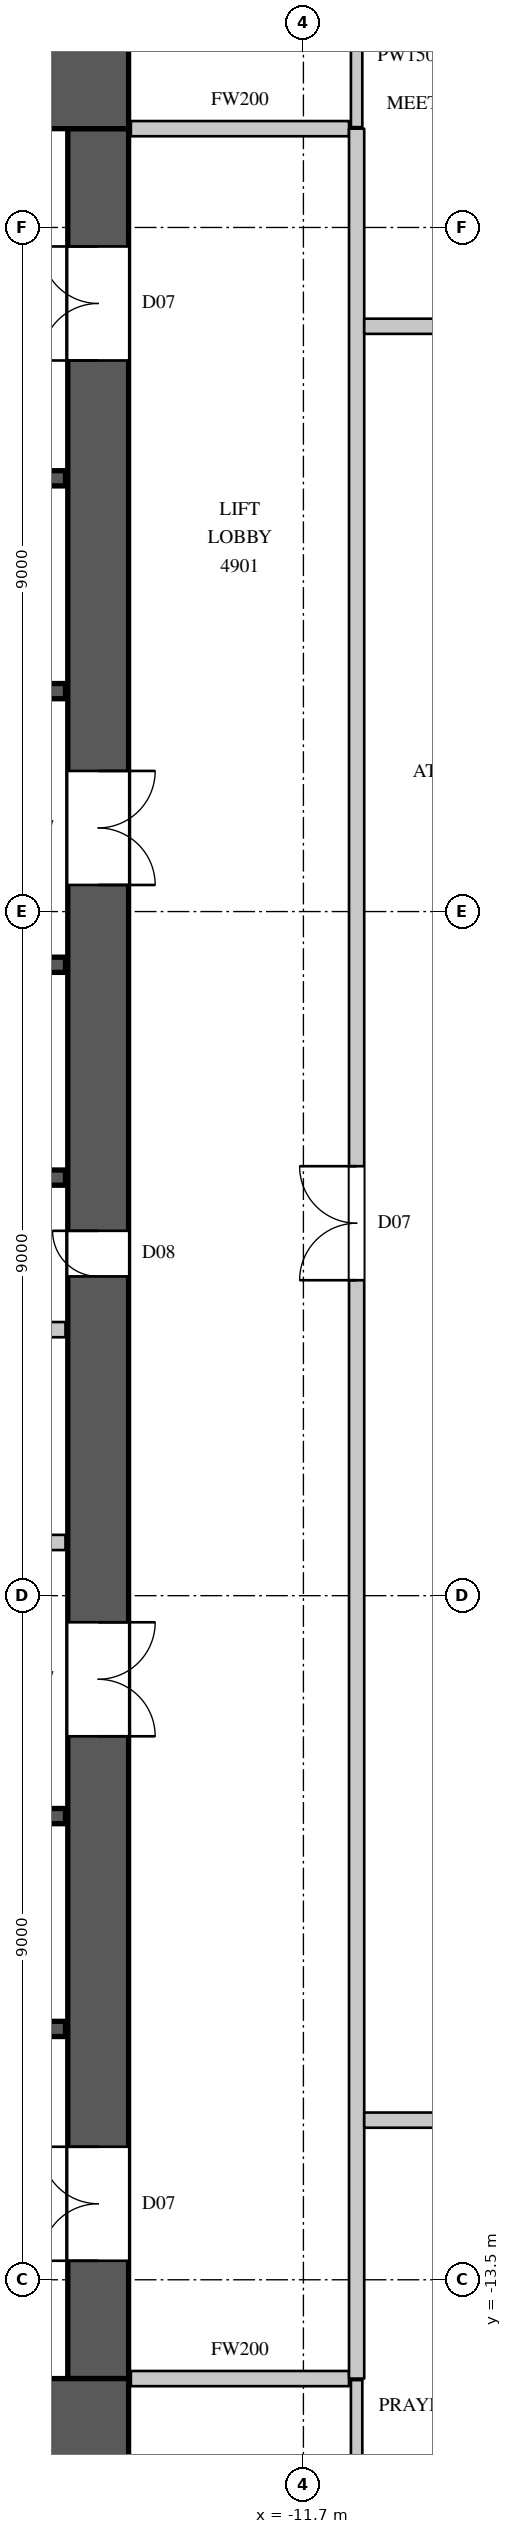
"""IFC4 building model, lengths in metres.
Left out: names, types, materials, properties, quantities, classifications, styles, units other than length and angle.
Written with IfcOpenShell. Run it as: python <this file> out.ifc"""

import sys

from ifc_helpers import new_model, si_unit, direction, frame, frame_2d, origin, place, context, subcontext, project, spatial, rectangle, extrude, element, fill, save


model = new_model("IFC4")
c1 = context("Model", 3, precision=1e-05, world=origin(), true_north=direction((0.0, 1.0)))
c2 = subcontext(c1, "Body", "Model", "MODEL_VIEW")
j1 = project(units=[si_unit("LENGTHUNIT", "METRE"), si_unit("PLANEANGLEUNIT", "RADIAN")], contexts=[c1])
p1 = place(None, origin())
s1 = spatial("IfcSite", under=j1, at=p1, CompositionType="ELEMENT")
p2 = place(p1, origin())
s2 = spatial("IfcBuilding", under=s1, at=p2, CompositionType="ELEMENT")
p3 = place(p2, frame((0.0, 0.0, 222.0)))
s3 = spatial("IfcBuildingStorey", under=s2, at=p3, CompositionType="ELEMENT", Elevation=222.0)
for number, where, z_axis, x_axis in (
    (1, (-30.0, 15.4, 0.0), (0.0, 0.0, 1.0), (1.0, 0.0, 0.0)),
    (2, (-30.0, -15.4, 0.0), (0.0, 0.0, 1.0), (1.0, 0.0, 0.0)),
):
    element("IfcWall", number, at=place(p3, frame(where, z_axis=z_axis, x_axis=x_axis)), inside=s3, PredefinedType="SHEAR", context=c2, shape_type="SweptSolid", body=[
        extrude(rectangle(XDim=16.0, YDim=1.2, at=frame_2d((8.0, 0.0))), origin(), (0.0, 0.0, 1.0), 4.1),
    ])
p4 = place(p3, frame((-14.4, -14.8, 0.0), z_axis=(0.0, 0.0, 1.0), x_axis=(0.0, 1.0, 0.0)))
e3 = element("IfcWall", 3, at=p4, inside=s3, PredefinedType="SHEAR", context=c2, shape_type="SweptSolid", body=[
    extrude(rectangle(XDim=29.6, YDim=0.8, at=frame_2d((14.8, 0.0))), origin(), (0.0, 0.0, 1.0), 4.1),
])
p5 = place(p4, frame((1.55, 0.0, 0.0)))
e4 = element("IfcOpeningElement", 4, at=p5, cuts=e3, PredefinedType="OPENING", context=c2, shape_type="SweptSolid", body=[
    extrude(rectangle(XDim=1.5, YDim=2.4, at=frame_2d((0.75, 1.2))), frame((0.0, 0.41, 0.0), z_axis=(0.0, -1.0, 0.0), x_axis=(1.0, 0.0, 0.0)), (0.0, 0.0, 1.0), 0.82),
])
p6 = place(p4, frame((26.55, 0.0, 0.0)))
e5 = element("IfcOpeningElement", 5, at=p6, cuts=e3, PredefinedType="OPENING", context=c2, shape_type="SweptSolid", body=[
    extrude(rectangle(XDim=1.5, YDim=2.4, at=frame_2d((0.75, 1.2))), frame((0.0, 0.41, 0.0), z_axis=(0.0, -1.0, 0.0), x_axis=(1.0, 0.0, 0.0)), (0.0, 0.0, 1.0), 0.82),
])
p7 = place(p4, frame((8.45, 0.0, 0.0)))
e6 = element("IfcOpeningElement", 6, at=p7, cuts=e3, PredefinedType="OPENING", context=c2, shape_type="SweptSolid", body=[
    extrude(rectangle(XDim=1.5, YDim=2.4, at=frame_2d((0.75, 1.2))), frame((0.0, 0.41, 0.0), z_axis=(0.0, -1.0, 0.0), x_axis=(1.0, 0.0, 0.0)), (0.0, 0.0, 1.0), 0.82),
])
p8 = place(p4, frame((19.65, 0.0, 0.0)))
e7 = element("IfcOpeningElement", 7, at=p8, cuts=e3, PredefinedType="OPENING", context=c2, shape_type="SweptSolid", body=[
    extrude(rectangle(XDim=1.5, YDim=2.4, at=frame_2d((0.75, 1.2))), frame((0.0, 0.41, 0.0), z_axis=(0.0, -1.0, 0.0), x_axis=(1.0, 0.0, 0.0)), (0.0, 0.0, 1.0), 0.82),
])
p9 = place(p4, frame((14.5, 0.0, 0.0)))
e8 = element("IfcOpeningElement", 8, at=p9, cuts=e3, PredefinedType="OPENING", context=c2, shape_type="SweptSolid", body=[
    extrude(rectangle(XDim=0.6, YDim=2.0, at=frame_2d((0.3, 1.0))), frame((0.0, 0.41, 0.0), z_axis=(0.0, -1.0, 0.0), x_axis=(1.0, 0.0, 0.0)), (0.0, 0.0, 1.0), 0.82),
])
p10 = place(p3, frame((-29.17, -3.8, 0.0), z_axis=(0.0, 0.0, 1.0), x_axis=(1.0, 0.0, 0.0)))
e9 = element("IfcWall", 9, at=p10, inside=s3, PredefinedType="PARTITIONING", context=c2, shape_type="SweptSolid", body=[
    extrude(rectangle(XDim=14.34, YDim=0.2, at=frame_2d((7.17, 0.0))), origin(), (0.0, 0.0, 1.0), 3.8),
])
p11 = place(p10, frame((6.7, 0.0, 0.0)))
e10 = element("IfcOpeningElement", 10, at=p11, cuts=e9, PredefinedType="OPENING", context=c2, shape_type="SweptSolid", body=[
    extrude(rectangle(XDim=0.9, YDim=2.2, at=frame_2d((0.45, 1.1))), frame((0.0, 0.11, 0.0), z_axis=(0.0, -1.0, 0.0), x_axis=(1.0, 0.0, 0.0)), (0.0, 0.0, 1.0), 0.22),
])
for number, where, z_axis, x_axis in (
    (11, (-13.97, -14.8, 0.0), (0.0, 0.0, 1.0), (1.0, 0.0, 0.0)),
    (12, (-13.97, 14.8, 0.0), (0.0, 0.0, 1.0), (1.0, 0.0, 0.0)),
):
    element("IfcWall", number, at=place(p3, frame(where, z_axis=z_axis, x_axis=x_axis)), inside=s3, PredefinedType="PARTITIONING", context=c2, shape_type="SweptSolid", body=[
        extrude(rectangle(XDim=2.87, YDim=0.2, at=frame_2d((1.435, 0.0))), origin(), (0.0, 0.0, 1.0), 3.8),
    ])
p12 = place(p3, frame((-11.0, -14.8, 0.0), z_axis=(0.0, 0.0, 1.0), x_axis=(0.0, 1.0, 0.0)))
e13 = element("IfcWall", 13, at=p12, inside=s3, PredefinedType="PARTITIONING", context=c2, shape_type="SweptSolid", body=[
    extrude(rectangle(XDim=29.6, YDim=0.2, at=frame_2d((14.8, 0.0))), origin(), (0.0, 0.0, 1.0), 3.8),
])
p13 = place(p12, frame((14.45, 0.0, 0.0)))
e14 = element("IfcOpeningElement", 14, at=p13, cuts=e13, PredefinedType="OPENING", context=c2, shape_type="SweptSolid", body=[
    extrude(rectangle(XDim=1.5, YDim=2.4, at=frame_2d((0.75, 1.2))), frame((0.0, 0.11, 0.0), z_axis=(0.0, -1.0, 0.0), x_axis=(1.0, 0.0, 0.0)), (0.0, 0.0, 1.0), 0.22),
])
p14 = place(p3, frame((-10.9, -11.4, 0.0), z_axis=(0.0, 0.0, 1.0), x_axis=(1.0, 0.0, 0.0)))
e15 = element("IfcWall", 15, at=p14, inside=s3, PredefinedType="PARTITIONING", context=c2, shape_type="SweptSolid", body=[
    extrude(rectangle(XDim=21.2, YDim=0.2, at=frame_2d((10.6, 0.0))), origin(), (0.0, 0.0, 1.0), 3.8),
])
p15 = place(p14, frame((0.95, 0.0, 0.0)))
e16 = element("IfcOpeningElement", 16, at=p15, cuts=e15, PredefinedType="OPENING", context=c2, shape_type="SweptSolid", body=[
    extrude(rectangle(XDim=0.95, YDim=2.2, at=frame_2d((0.475, 1.1))), frame((0.0, 0.11, 0.0), z_axis=(0.0, -1.0, 0.0), x_axis=(1.0, 0.0, 0.0)), (0.0, 0.0, 1.0), 0.22),
])
p16 = place(p14, frame((4.2, 0.0, 0.0)))
e17 = element("IfcOpeningElement", 17, at=p16, cuts=e15, PredefinedType="OPENING", context=c2, shape_type="SweptSolid", body=[
    extrude(rectangle(XDim=0.9, YDim=2.2, at=frame_2d((0.45, 1.1))), frame((0.0, 0.11, 0.0), z_axis=(0.0, -1.0, 0.0), x_axis=(1.0, 0.0, 0.0)), (0.0, 0.0, 1.0), 0.22),
])
p17 = place(p14, frame((8.35, 0.0, 0.0)))
e18 = element("IfcOpeningElement", 18, at=p17, cuts=e15, PredefinedType="OPENING", context=c2, shape_type="SweptSolid", body=[
    extrude(rectangle(XDim=1.1, YDim=2.4, at=frame_2d((0.55, 1.2))), frame((0.0, 0.11, 0.0), z_axis=(0.0, -1.0, 0.0), x_axis=(1.0, 0.0, 0.0)), (0.0, 0.0, 1.0), 0.22),
])
p18 = place(p14, frame((18.0, 0.0, 0.0)))
e19 = element("IfcOpeningElement", 19, at=p18, cuts=e15, PredefinedType="OPENING", context=c2, shape_type="SweptSolid", body=[
    extrude(rectangle(XDim=1.1, YDim=2.4, at=frame_2d((0.55, 1.2))), frame((0.0, 0.11, 0.0), z_axis=(0.0, -1.0, 0.0), x_axis=(1.0, 0.0, 0.0)), (0.0, 0.0, 1.0), 0.22),
])
p19 = place(p3, frame((-10.9, 12.2, 0.0), z_axis=(0.0, 0.0, 1.0), x_axis=(1.0, 0.0, 0.0)))
e20 = element("IfcWall", 20, at=p19, inside=s3, PredefinedType="PARTITIONING", context=c2, shape_type="SweptSolid", body=[
    extrude(rectangle(XDim=3.704, YDim=0.2, at=frame_2d((1.852, 0.0))), origin(), (0.0, 0.0, 1.0), 3.8),
])
p20 = place(p19, frame((1.7, 0.0, 0.0)))
e21 = element("IfcOpeningElement", 21, at=p20, cuts=e20, PredefinedType="OPENING", context=c2, shape_type="SweptSolid", body=[
    extrude(rectangle(XDim=1.1, YDim=2.4, at=frame_2d((0.55, 1.2))), frame((0.0, 0.11, 0.0), z_axis=(0.0, -1.0, 0.0), x_axis=(1.0, 0.0, 0.0)), (0.0, 0.0, 1.0), 0.22),
])
for number, where, z_axis, x_axis in (
    (22, (-11.0, -16.7, 0.0), (0.0, 0.0, 1.0), (0.0, 1.0, 0.0)),
    (23, (-11.0, 14.82, 0.0), (0.0, 0.0, 1.0), (0.0, 1.0, 0.0)),
):
    element("IfcWall", number, at=place(p3, frame(where, z_axis=z_axis, x_axis=x_axis)), inside=s3, PredefinedType="PARTITIONING", context=c2, shape_type="SweptSolid", body=[
        extrude(rectangle(XDim=1.88, YDim=0.15, at=frame_2d((0.94, 0.0))), origin(), (0.0, 0.0, 1.0), 3.8),
    ])
p21 = place(p3, frame((-29.17, -1.0, 0.0), z_axis=(0.0, 0.0, 1.0), x_axis=(1.0, 0.0, 0.0)))
e24 = element("IfcWall", 24, at=p21, inside=s3, PredefinedType="PARTITIONING", context=c2, shape_type="SweptSolid", body=[
    extrude(rectangle(XDim=14.34, YDim=0.2, at=frame_2d((7.17, 0.0))), origin(), (0.0, 0.0, 1.0), 3.8),
])
p22 = place(p3, frame((-26.08, 1.0, 0.0), z_axis=(0.0, 0.0, 1.0), x_axis=(1.0, 0.0, 0.0)))
e25 = element("IfcWall", 25, at=p22, inside=s3, PredefinedType="SHEAR", context=c2, shape_type="SweptSolid", body=[
    extrude(rectangle(XDim=11.25, YDim=0.2, at=frame_2d((5.625, 0.0))), origin(), (0.0, 0.0, 1.0), 3.8),
])
p23 = place(p3, frame((-26.08, 3.8, 0.0), z_axis=(0.0, 0.0, 1.0), x_axis=(1.0, 0.0, 0.0)))
e26 = element("IfcWall", 26, at=p23, inside=s3, PredefinedType="SHEAR", context=c2, shape_type="SweptSolid", body=[
    extrude(rectangle(XDim=11.25, YDim=0.2, at=frame_2d((5.625, 0.0))), origin(), (0.0, 0.0, 1.0), 3.8),
])
p24 = place(p23, frame((0.8, 0.0, 0.0)))
e27 = element("IfcOpeningElement", 27, at=p24, cuts=e26, PredefinedType="OPENING", context=c2, shape_type="SweptSolid", body=[
    extrude(rectangle(XDim=1.1, YDim=2.2, at=frame_2d((0.55, 1.1))), frame((0.0, 0.11, 0.0), z_axis=(0.0, -1.0, 0.0), x_axis=(1.0, 0.0, 0.0)), (0.0, 0.0, 1.0), 0.22),
])
p25 = place(p23, frame((3.55, 0.0, 0.0)))
e28 = element("IfcOpeningElement", 28, at=p25, cuts=e26, PredefinedType="OPENING", context=c2, shape_type="SweptSolid", body=[
    extrude(rectangle(XDim=1.1, YDim=2.2, at=frame_2d((0.55, 1.1))), frame((0.0, 0.11, 0.0), z_axis=(0.0, -1.0, 0.0), x_axis=(1.0, 0.0, 0.0)), (0.0, 0.0, 1.0), 0.22),
])
p26 = place(p23, frame((6.25, 0.0, 0.0)))
e29 = element("IfcOpeningElement", 29, at=p26, cuts=e26, PredefinedType="OPENING", context=c2, shape_type="SweptSolid", body=[
    extrude(rectangle(XDim=1.1, YDim=2.2, at=frame_2d((0.55, 1.1))), frame((0.0, 0.11, 0.0), z_axis=(0.0, -1.0, 0.0), x_axis=(1.0, 0.0, 0.0)), (0.0, 0.0, 1.0), 0.22),
])
p27 = place(p23, frame((9.15, 0.0, 0.0)))
e30 = element("IfcOpeningElement", 30, at=p27, cuts=e26, PredefinedType="OPENING", context=c2, shape_type="SweptSolid", body=[
    extrude(rectangle(XDim=1.1, YDim=2.2, at=frame_2d((0.55, 1.1))), frame((0.0, 0.11, 0.0), z_axis=(0.0, -1.0, 0.0), x_axis=(1.0, 0.0, 0.0)), (0.0, 0.0, 1.0), 0.22),
])
p28 = place(p3, frame((-17.92, -10.2, 0.0), z_axis=(0.0, 0.0, 1.0), x_axis=(1.0, 0.0, 0.0)))
e31 = element("IfcWall", 31, at=p28, inside=s3, PredefinedType="SHEAR", context=c2, shape_type="SweptSolid", body=[
    extrude(rectangle(XDim=3.09, YDim=0.2, at=frame_2d((1.545, 0.0))), origin(), (0.0, 0.0, 1.0), 3.8),
])
p29 = place(p28, frame((1.0, 0.0, 0.0)))
e32 = element("IfcOpeningElement", 32, at=p29, cuts=e31, PredefinedType="OPENING", context=c2, shape_type="SweptSolid", body=[
    extrude(rectangle(XDim=1.1, YDim=2.2, at=frame_2d((0.55, 1.1))), frame((0.0, 0.11, 0.0), z_axis=(0.0, -1.0, 0.0), x_axis=(1.0, 0.0, 0.0)), (0.0, 0.0, 1.0), 0.22),
])
p30 = place(p3, frame((-17.9, -7.4, 0.0), z_axis=(0.0, 0.0, 1.0), x_axis=(1.0, 0.0, 0.0)))
e33 = element("IfcWall", 33, at=p30, inside=s3, PredefinedType="SHEAR", context=c2, shape_type="SweptSolid", body=[
    extrude(rectangle(XDim=3.07, YDim=0.2, at=frame_2d((1.535, 0.0))), origin(), (0.0, 0.0, 1.0), 3.8),
])
p31 = place(p3, frame((-17.92, 7.4, 0.0), z_axis=(0.0, 0.0, 1.0), x_axis=(1.0, 0.0, 0.0)))
e34 = element("IfcWall", 34, at=p31, inside=s3, PredefinedType="SHEAR", context=c2, shape_type="SweptSolid", body=[
    extrude(rectangle(XDim=3.09, YDim=0.2, at=frame_2d((1.545, 0.0))), origin(), (0.0, 0.0, 1.0), 3.8),
])
p32 = place(p3, frame((-17.92, 10.2, 0.0), z_axis=(0.0, 0.0, 1.0), x_axis=(1.0, 0.0, 0.0)))
e35 = element("IfcWall", 35, at=p32, inside=s3, PredefinedType="SHEAR", context=c2, shape_type="SweptSolid", body=[
    extrude(rectangle(XDim=3.09, YDim=0.2, at=frame_2d((1.545, 0.0))), origin(), (0.0, 0.0, 1.0), 3.8),
])
p33 = place(p32, frame((1.0, 0.0, 0.0)))
e36 = element("IfcOpeningElement", 36, at=p33, cuts=e35, PredefinedType="OPENING", context=c2, shape_type="SweptSolid", body=[
    extrude(rectangle(XDim=1.1, YDim=2.2, at=frame_2d((0.55, 1.1))), frame((0.0, 0.11, 0.0), z_axis=(0.0, -1.0, 0.0), x_axis=(1.0, 0.0, 0.0)), (0.0, 0.0, 1.0), 0.22),
])
p34 = place(p13, origin())
e37 = element("IfcDoor", 37, at=p34, inside=s3, OperationType="DOUBLE_DOOR_SINGLE_SWING", PredefinedType="DOOR", context=c2, shape_type="SweptSolid", body=[
    extrude(rectangle(XDim=1.5, YDim=2.4, at=frame_2d((0.75, 1.2))), frame((0.0, 0.025, 0.0), z_axis=(0.0, -1.0, 0.0), x_axis=(1.0, 0.0, 0.0)), (0.0, 0.0, 1.0), 0.05),
])
fill(e14, e37)
p35 = place(p5, origin())
e38 = element("IfcDoor", 38, at=p35, inside=s3, OperationType="DOUBLE_DOOR_SINGLE_SWING", PredefinedType="DOOR", context=c2, shape_type="SweptSolid", body=[
    extrude(rectangle(XDim=1.5, YDim=2.4, at=frame_2d((0.75, 1.2))), frame((0.0, 0.395, 0.0), z_axis=(0.0, -1.0, 0.0), x_axis=(1.0, 0.0, 0.0)), (0.0, 0.0, 1.0), 0.05),
])
fill(e4, e38)
p36 = place(p6, origin())
e39 = element("IfcDoor", 39, at=p36, inside=s3, OperationType="DOUBLE_DOOR_SINGLE_SWING", PredefinedType="DOOR", context=c2, shape_type="SweptSolid", body=[
    extrude(rectangle(XDim=1.5, YDim=2.4, at=frame_2d((0.75, 1.2))), frame((0.0, 0.395, 0.0), z_axis=(0.0, -1.0, 0.0), x_axis=(1.0, 0.0, 0.0)), (0.0, 0.0, 1.0), 0.05),
])
fill(e5, e39)
p37 = place(p7, origin())
e40 = element("IfcDoor", 40, at=p37, inside=s3, OperationType="DOUBLE_DOOR_SINGLE_SWING", PredefinedType="DOOR", context=c2, shape_type="SweptSolid", body=[
    extrude(rectangle(XDim=1.5, YDim=2.4, at=frame_2d((0.75, 1.2))), frame((0.0, -0.345, 0.0), z_axis=(0.0, -1.0, 0.0), x_axis=(1.0, 0.0, 0.0)), (0.0, 0.0, 1.0), 0.05),
])
fill(e6, e40)
p38 = place(p8, origin())
e41 = element("IfcDoor", 41, at=p38, inside=s3, OperationType="DOUBLE_DOOR_SINGLE_SWING", PredefinedType="DOOR", context=c2, shape_type="SweptSolid", body=[
    extrude(rectangle(XDim=1.5, YDim=2.4, at=frame_2d((0.75, 1.2))), frame((0.0, -0.345, 0.0), z_axis=(0.0, -1.0, 0.0), x_axis=(1.0, 0.0, 0.0)), (0.0, 0.0, 1.0), 0.05),
])
fill(e7, e41)
p39 = place(p9, origin())
e42 = element("IfcDoor", 42, at=p39, inside=s3, OperationType="SINGLE_SWING_RIGHT", PredefinedType="DOOR", context=c2, shape_type="SweptSolid", body=[
    extrude(rectangle(XDim=0.6, YDim=2.0, at=frame_2d((0.3, 1.0))), frame((0.0, 0.395, 0.0), z_axis=(0.0, -1.0, 0.0), x_axis=(1.0, 0.0, 0.0)), (0.0, 0.0, 1.0), 0.05),
])
fill(e8, e42)
save(model, sys.argv[1])
